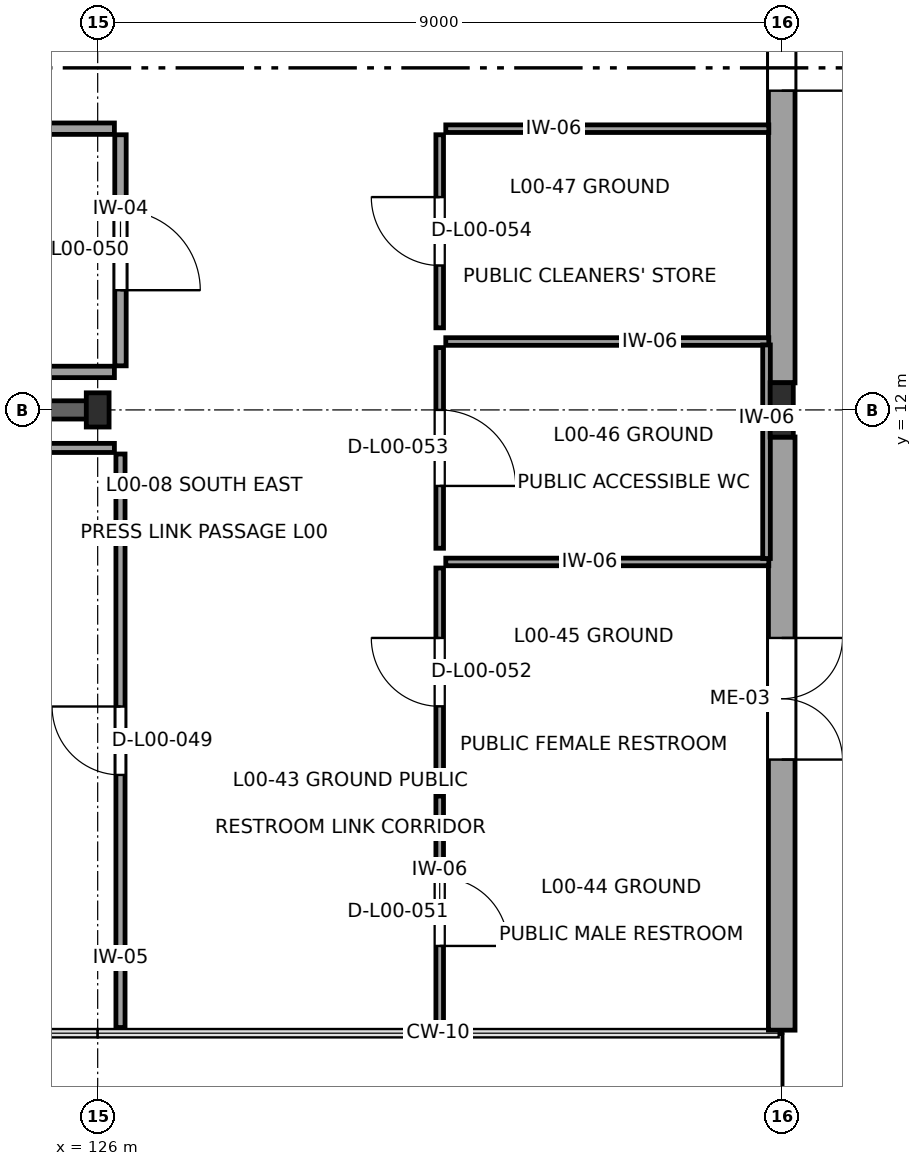
"""IFC4 building model, lengths in metres.
Left out: names, types, materials, properties, quantities, classifications, styles, units other than length and angle.
Written with IfcOpenShell. Run it as: python <this file> out.ifc"""

import sys

from ifc_helpers import new_model, si_unit, direction, frame, frame_2d, origin, origin_2d, place, context, subcontext, project, spatial, rectangle, i_section, extrude, element, fill, save


model = new_model("IFC4")
c1 = context("Model", 3, precision=1e-05, world=origin(), true_north=direction((0.0, 1.0)))
c2 = subcontext(c1, "Body", "Model", "MODEL_VIEW")
j1 = project(units=[si_unit("LENGTHUNIT", "METRE"), si_unit("PLANEANGLEUNIT", "RADIAN")], contexts=[c1])
p1 = place(None, origin())
s1 = spatial("IfcSite", under=j1, at=p1, CompositionType="ELEMENT")
p2 = place(p1, origin())
s2 = spatial("IfcBuilding", under=s1, at=p2, CompositionType="ELEMENT")
p3 = place(p2, origin())
s3 = spatial("IfcBuildingStorey", under=s2, at=p3, CompositionType="ELEMENT", Elevation=0.0)
p4 = place(p3, frame((126.0, 12.0, 0.0), z_axis=(0.0, 0.0, 1.0), x_axis=(1.0, 0.0, 0.0)))
e1 = element("IfcColumn", 1, at=p4, inside=s3, PredefinedType="COLUMN", context=c2, shape_type="SweptSolid", body=[
    extrude(i_section(OverallWidth=0.3, OverallDepth=0.45, WebThickness=0.014, FlangeThickness=0.026, at=origin_2d()), origin(), (0.0, 0.0, 1.0), 5.4),
])
p5 = place(p3, frame((135.0, 12.0, 0.0), z_axis=(0.0, 0.0, 1.0), x_axis=(1.0, 0.0, 0.0)))
e2 = element("IfcColumn", 2, at=p5, inside=s3, PredefinedType="COLUMN", context=c2, shape_type="SweptSolid", body=[
    extrude(i_section(OverallWidth=0.304, OverallDepth=0.716, WebThickness=0.021, FlangeThickness=0.04, at=origin_2d()), origin(), (0.0, 0.0, 1.0), 5.4),
])
p6 = place(p3, frame((135.0, 3.84, 0.0), z_axis=(0.0, 0.0, 1.0), x_axis=(0.0, 1.0, 0.0)))
e3 = element("IfcWall", 3, at=p6, inside=s3, PredefinedType="SOLIDWALL", context=c2, shape_type="SweptSolid", body=[
    extrude(rectangle(XDim=7.804, YDim=0.35, at=frame_2d((3.902, 0.0))), origin(), (0.0, 0.0, 1.0), 4.525),
])
p7 = place(p6, frame((3.56, 0.0, 0.0)))
e4 = element("IfcOpeningElement", 4, at=p7, cuts=e3, PredefinedType="OPENING", context=c2, shape_type="SweptSolid", body=[
    extrude(rectangle(XDim=1.6, YDim=2.3, at=frame_2d((0.8, 1.15))), frame((0.0, 0.19, 0.0), z_axis=(0.0, -1.0, 0.0), x_axis=(1.0, 0.0, 0.0)), (0.0, 0.0, 1.0), 0.38),
])
p8 = place(p3, frame((135.0, 12.356, 0.0), z_axis=(0.0, 0.0, 1.0), x_axis=(0.0, 1.0, 0.0)))
e5 = element("IfcWall", 5, at=p8, inside=s3, PredefinedType="SOLIDWALL", context=c2, shape_type="SweptSolid", body=[
    extrude(rectangle(XDim=11.288, YDim=0.35, at=frame_2d((5.644, 0.0))), origin(), (0.0, 0.0, 1.0), 4.525),
])
p9 = place(p8, frame((3.844, 0.0, 0.0)))
e6 = element("IfcOpeningElement", 6, at=p9, cuts=e5, PredefinedType="OPENING", context=c2, shape_type="SweptSolid", body=[
    extrude(rectangle(XDim=2.4, YDim=2.8, at=frame_2d((1.2, 1.4))), frame((0.0, 0.19, 0.0), z_axis=(0.0, -1.0, 0.0), x_axis=(1.0, 0.0, 0.0)), (0.0, 0.0, 1.0), 0.38),
])
p10 = place(p3, frame((117.273, 12.0, 0.0), z_axis=(0.0, 0.0, 1.0), x_axis=(1.0, 0.0, 0.0)))
e7 = element("IfcWall", 7, at=p10, inside=s3, PredefinedType="SHEAR", context=c2, shape_type="SweptSolid", body=[
    extrude(rectangle(XDim=8.719, YDim=0.24, at=frame_2d((4.359, 0.0))), origin(), (0.0, 0.0, 1.0), 4.535),
])
p11 = place(p3, frame((116.795, 11.5, 0.0), z_axis=(0.0, 0.0, 1.0), x_axis=(1.0, 0.0, 0.0)))
e8 = element("IfcWall", 8, at=p11, inside=s3, PredefinedType="PARTITIONING", context=c2, shape_type="SweptSolid", body=[
    extrude(rectangle(XDim=9.425, YDim=0.12, at=frame_2d((4.712, 0.0))), origin(), (0.0, 0.0, 1.0), 5.04),
])
p12 = place(p3, frame((126.3, 11.42, 0.0), z_axis=(0.0, 0.0, 1.0), x_axis=(0.0, -1.0, 0.0)))
e9 = element("IfcWall", 9, at=p12, inside=s3, PredefinedType="PARTITIONING", context=c2, shape_type="SweptSolid", body=[
    extrude(rectangle(XDim=7.545, YDim=0.12, at=frame_2d((3.772, 0.0))), origin(), (0.0, 0.0, 1.0), 5.04),
])
p13 = place(p12, frame((3.322, 0.0, 0.0)))
e10 = element("IfcOpeningElement", 10, at=p13, cuts=e9, PredefinedType="OPENING", context=c2, shape_type="SweptSolid", body=[
    extrude(rectangle(XDim=0.9, YDim=2.1, at=frame_2d((0.45, 1.05))), frame((0.0, 0.075, 0.0), z_axis=(0.0, -1.0, 0.0), x_axis=(1.0, 0.0, 0.0)), (0.0, 0.0, 1.0), 0.15),
])
p14 = place(p3, frame((126.3, 15.62, 0.0), z_axis=(0.0, 0.0, 1.0), x_axis=(0.0, -1.0, 0.0)))
e11 = element("IfcWall", 11, at=p14, inside=s3, PredefinedType="PARTITIONING", context=c2, shape_type="SweptSolid", body=[
    extrude(rectangle(XDim=3.04, YDim=0.15, at=frame_2d((1.52, 0.0))), origin(), (0.0, 0.0, 1.0), 5.04),
])
p15 = place(p14, frame((0.995, 0.0, 0.0)))
e12 = element("IfcOpeningElement", 12, at=p15, cuts=e11, PredefinedType="OPENING", context=c2, shape_type="SweptSolid", body=[
    extrude(rectangle(XDim=1.05, YDim=2.25, at=frame_2d((0.525, 1.125))), frame((0.0, 0.09, 0.0), z_axis=(0.0, -1.0, 0.0), x_axis=(1.0, 0.0, 0.0)), (0.0, 0.0, 1.0), 0.18),
])
for number, where, z_axis, x_axis in (
    (13, (126.22, 12.5, 0.0), (0.0, 0.0, 1.0), (-1.0, 0.0, 0.0)),
    (14, (116.795, 15.7, 0.0), (0.0, 0.0, 1.0), (1.0, 0.0, 0.0)),
):
    element("IfcWall", number, at=place(p3, frame(where, z_axis=z_axis, x_axis=x_axis)), inside=s3, PredefinedType="PARTITIONING", context=c2, shape_type="SweptSolid", body=[
        extrude(rectangle(XDim=9.425, YDim=0.15, at=frame_2d((4.712, 0.0))), origin(), (0.0, 0.0, 1.0), 5.04),
    ])
p16 = place(p3, frame((130.5, 3.875, 0.0), z_axis=(0.0, 0.0, 1.0), x_axis=(0.0, 1.0, 0.0)))
e15 = element("IfcWall", 15, at=p16, inside=s3, PredefinedType="PARTITIONING", context=c2, shape_type="SweptSolid", body=[
    extrude(rectangle(XDim=3.045, YDim=0.1, at=frame_2d((1.522, 0.0))), origin(), (0.0, 0.0, 1.0), 5.04),
])
p17 = place(p16, frame((1.073, 0.0, 0.0)))
e16 = element("IfcOpeningElement", 16, at=p17, cuts=e15, PredefinedType="OPENING", context=c2, shape_type="SweptSolid", body=[
    extrude(rectangle(XDim=0.9, YDim=2.05, at=frame_2d((0.45, 1.025))), frame((0.0, 0.065, 0.0), z_axis=(0.0, -1.0, 0.0), x_axis=(1.0, 0.0, 0.0)), (0.0, 0.0, 1.0), 0.13),
])
p18 = place(p3, frame((130.5, 7.18, 0.0), z_axis=(0.0, 0.0, 1.0), x_axis=(0.0, 1.0, 0.0)))
e17 = element("IfcWall", 17, at=p18, inside=s3, PredefinedType="PARTITIONING", context=c2, shape_type="SweptSolid", body=[
    extrude(rectangle(XDim=2.74, YDim=0.1, at=frame_2d((1.37, 0.0))), origin(), (0.0, 0.0, 1.0), 5.04),
])
p19 = place(p18, frame((0.92, 0.0, 0.0)))
e18 = element("IfcOpeningElement", 18, at=p19, cuts=e17, PredefinedType="OPENING", context=c2, shape_type="SweptSolid", body=[
    extrude(rectangle(XDim=0.9, YDim=2.05, at=frame_2d((0.45, 1.025))), frame((0.0, 0.065, 0.0), z_axis=(0.0, -1.0, 0.0), x_axis=(1.0, 0.0, 0.0)), (0.0, 0.0, 1.0), 0.13),
])
for number, where, z_axis, x_axis in (
    (19, (130.58, 10.0, 0.0), (0.0, 0.0, 1.0), (1.0, 0.0, 0.0)),
    (20, (130.58, 12.9, 0.0), (0.0, 0.0, 1.0), (1.0, 0.0, 0.0)),
):
    element("IfcWall", number, at=place(p3, frame(where, z_axis=z_axis, x_axis=x_axis)), inside=s3, PredefinedType="PARTITIONING", context=c2, shape_type="SweptSolid", body=[
        extrude(rectangle(XDim=4.25, YDim=0.1, at=frame_2d((2.125, 0.0))), origin(), (0.0, 0.0, 1.0), 5.04),
    ])
p20 = place(p3, frame((134.8, 12.855, 0.0), z_axis=(0.0, 0.0, 1.0), x_axis=(0.0, -1.0, 0.0)))
e21 = element("IfcWall", 21, at=p20, inside=s3, PredefinedType="PARTITIONING", context=c2, shape_type="SweptSolid", body=[
    extrude(rectangle(XDim=2.81, YDim=0.1, at=frame_2d((1.405, 0.0))), origin(), (0.0, 0.0, 1.0), 5.04),
])
p21 = place(p3, frame((130.5, 10.18, 0.0), z_axis=(0.0, 0.0, 1.0), x_axis=(0.0, 1.0, 0.0)))
e22 = element("IfcWall", 22, at=p21, inside=s3, PredefinedType="PARTITIONING", context=c2, shape_type="SweptSolid", body=[
    extrude(rectangle(XDim=2.64, YDim=0.1, at=frame_2d((1.32, 0.0))), origin(), (0.0, 0.0, 1.0), 5.04),
])
p22 = place(p21, frame((0.82, 0.0, 0.0)))
e23 = element("IfcOpeningElement", 23, at=p22, cuts=e22, PredefinedType="OPENING", context=c2, shape_type="SweptSolid", body=[
    extrude(rectangle(XDim=1.0, YDim=2.1, at=frame_2d((0.5, 1.05))), frame((0.0, 0.065, 0.0), z_axis=(0.0, -1.0, 0.0), x_axis=(1.0, 0.0, 0.0)), (0.0, 0.0, 1.0), 0.13),
])
p23 = place(p3, frame((130.58, 15.7, 0.0), z_axis=(0.0, 0.0, 1.0), x_axis=(1.0, 0.0, 0.0)))
e24 = element("IfcWall", 24, at=p23, inside=s3, PredefinedType="PARTITIONING", context=c2, shape_type="SweptSolid", body=[
    extrude(rectangle(XDim=4.25, YDim=0.1, at=frame_2d((2.125, 0.0))), origin(), (0.0, 0.0, 1.0), 5.04),
])
p24 = place(p3, frame((130.5, 13.08, 0.0), z_axis=(0.0, 0.0, 1.0), x_axis=(0.0, 1.0, 0.0)))
e25 = element("IfcWall", 25, at=p24, inside=s3, PredefinedType="PARTITIONING", context=c2, shape_type="SweptSolid", body=[
    extrude(rectangle(XDim=2.54, YDim=0.1, at=frame_2d((1.27, 0.0))), origin(), (0.0, 0.0, 1.0), 5.04),
])
p25 = place(p24, frame((0.82, 0.0, 0.0)))
e26 = element("IfcOpeningElement", 26, at=p25, cuts=e25, PredefinedType="OPENING", context=c2, shape_type="SweptSolid", body=[
    extrude(rectangle(XDim=0.9, YDim=2.05, at=frame_2d((0.45, 1.025))), frame((0.0, 0.065, 0.0), z_axis=(0.0, -1.0, 0.0), x_axis=(1.0, 0.0, 0.0)), (0.0, 0.0, 1.0), 0.13),
])
p26 = place(p9, frame((2.4, 0.0, 0.0), z_axis=(0.0, 0.0, 1.0), x_axis=(-1.0, 0.0, 0.0)))
e27 = element("IfcDoor", 27, at=p26, inside=s3, OperationType="DOUBLE_DOOR_SINGLE_SWING", PredefinedType="DOOR", context=c2, shape_type="SweptSolid", body=[
    extrude(rectangle(XDim=2.4, YDim=2.8, at=frame_2d((1.2, 1.4))), frame((0.0, 0.025, 0.0), z_axis=(0.0, -1.0, 0.0), x_axis=(1.0, 0.0, 0.0)), (0.0, 0.0, 1.0), 0.05),
])
fill(e6, e27)
p27 = place(p7, frame((1.6, 0.0, 0.0), z_axis=(0.0, 0.0, 1.0), x_axis=(-1.0, 0.0, 0.0)))
e28 = element("IfcDoor", 28, at=p27, inside=s3, OperationType="DOUBLE_DOOR_SINGLE_SWING", PredefinedType="DOOR", context=c2, shape_type="SweptSolid", body=[
    extrude(rectangle(XDim=1.6, YDim=2.3, at=frame_2d((0.8, 1.15))), frame((0.0, 0.025, 0.0), z_axis=(0.0, -1.0, 0.0), x_axis=(1.0, 0.0, 0.0)), (0.0, 0.0, 1.0), 0.05),
])
fill(e4, e28)
p28 = place(p13, frame((0.9, 0.0, 0.0), z_axis=(0.0, 0.0, 1.0), x_axis=(-1.0, 0.0, 0.0)))
e29 = element("IfcDoor", 29, at=p28, inside=s3, OperationType="SINGLE_SWING_LEFT", PredefinedType="DOOR", context=c2, shape_type="SweptSolid", body=[
    extrude(rectangle(XDim=0.9, YDim=2.1, at=frame_2d((0.45, 1.05))), frame((0.0, 0.025, 0.0), z_axis=(0.0, -1.0, 0.0), x_axis=(1.0, 0.0, 0.0)), (0.0, 0.0, 1.0), 0.05),
])
fill(e10, e29)
p29 = place(p15, origin())
e30 = element("IfcDoor", 30, at=p29, inside=s3, OperationType="SINGLE_SWING_RIGHT", PredefinedType="DOOR", context=c2, shape_type="SweptSolid", body=[
    extrude(rectangle(XDim=1.05, YDim=2.25, at=frame_2d((0.525, 1.125))), frame((0.0, 0.025, 0.0), z_axis=(0.0, -1.0, 0.0), x_axis=(1.0, 0.0, 0.0)), (0.0, 0.0, 1.0), 0.05),
])
fill(e12, e30)
p30 = place(p17, frame((0.9, 0.0, 0.0), z_axis=(0.0, 0.0, 1.0), x_axis=(-1.0, 0.0, 0.0)))
e31 = element("IfcDoor", 31, at=p30, inside=s3, OperationType="SINGLE_SWING_LEFT", PredefinedType="DOOR", context=c2, shape_type="SweptSolid", body=[
    extrude(rectangle(XDim=0.9, YDim=2.05, at=frame_2d((0.45, 1.025))), frame((0.0, 0.025, 0.0), z_axis=(0.0, -1.0, 0.0), x_axis=(1.0, 0.0, 0.0)), (0.0, 0.0, 1.0), 0.05),
])
fill(e16, e31)
p31 = place(p19, origin())
e32 = element("IfcDoor", 32, at=p31, inside=s3, OperationType="SINGLE_SWING_RIGHT", PredefinedType="DOOR", context=c2, shape_type="SweptSolid", body=[
    extrude(rectangle(XDim=0.9, YDim=2.05, at=frame_2d((0.45, 1.025))), frame((0.0, 0.025, 0.0), z_axis=(0.0, -1.0, 0.0), x_axis=(1.0, 0.0, 0.0)), (0.0, 0.0, 1.0), 0.05),
])
fill(e18, e32)
p32 = place(p22, frame((1.0, 0.0, 0.0), z_axis=(0.0, 0.0, 1.0), x_axis=(-1.0, 0.0, 0.0)))
e33 = element("IfcDoor", 33, at=p32, inside=s3, OperationType="SINGLE_SWING_LEFT", PredefinedType="DOOR", context=c2, shape_type="SweptSolid", body=[
    extrude(rectangle(XDim=1.0, YDim=2.1, at=frame_2d((0.5, 1.05))), frame((0.0, 0.025, 0.0), z_axis=(0.0, -1.0, 0.0), x_axis=(1.0, 0.0, 0.0)), (0.0, 0.0, 1.0), 0.05),
])
fill(e23, e33)
p33 = place(p25, origin())
e34 = element("IfcDoor", 34, at=p33, inside=s3, OperationType="SINGLE_SWING_RIGHT", PredefinedType="DOOR", context=c2, shape_type="SweptSolid", body=[
    extrude(rectangle(XDim=0.9, YDim=2.05, at=frame_2d((0.45, 1.025))), frame((0.0, 0.025, 0.0), z_axis=(0.0, -1.0, 0.0), x_axis=(1.0, 0.0, 0.0)), (0.0, 0.0, 1.0), 0.05),
])
fill(e26, e34)
save(model, sys.argv[1])
